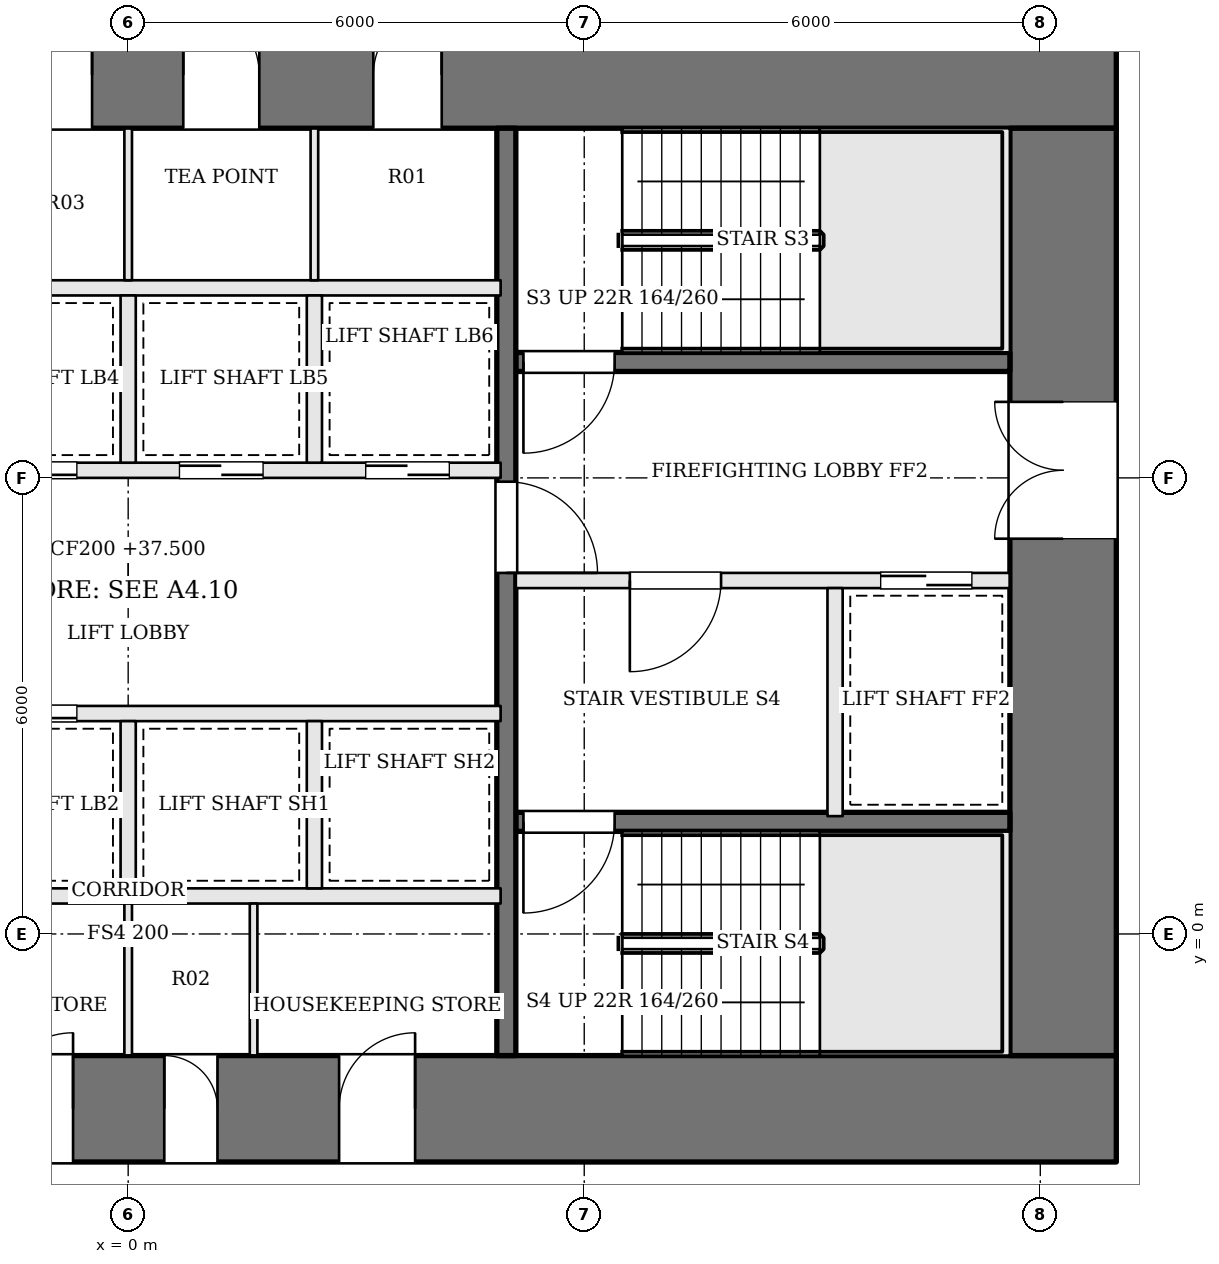
"""IFC4 building model, lengths in metres.
Left out: names, types, materials, properties, quantities, classifications, styles, units other than length and angle.
Written with IfcOpenShell. Run it as: python <this file> out.ifc"""

import sys

from ifc_helpers import new_model, si_unit, direction, frame, frame_2d, origin, place, context, subcontext, project, spatial, rectangle, extrude, element, fill, save


model = new_model("IFC4")
c1 = context("Model", 3, precision=1e-05, world=origin(), true_north=direction((0.0, 1.0)))
c2 = subcontext(c1, "Body", "Model", "MODEL_VIEW")
j1 = project(units=[si_unit("LENGTHUNIT", "METRE"), si_unit("PLANEANGLEUNIT", "RADIAN")], contexts=[c1])
p1 = place(None, origin())
s1 = spatial("IfcSite", under=j1, at=p1, CompositionType="ELEMENT")
p2 = place(p1, origin())
s2 = spatial("IfcBuilding", under=s1, at=p2, CompositionType="ELEMENT")
p3 = place(p2, frame((0.0, 0.0, 37.5)))
s3 = spatial("IfcBuildingStorey", under=s2, at=p3, CompositionType="ELEMENT", Elevation=37.5)
p4 = place(p3, frame((-13.0, 11.3, 0.0), z_axis=(0.0, 0.0, 1.0), x_axis=(1.0, 0.0, 0.0)))
e1 = element("IfcWall", 1, at=p4, inside=s3, PredefinedType="SHEAR", context=c2, shape_type="SweptSolid", body=[
    extrude(rectangle(XDim=26.0, YDim=1.4, at=frame_2d((13.0, 0.0))), origin(), (0.0, 0.0, 1.0), 3.6),
])
p5 = place(p4, frame((9.225, 0.0, 0.0)))
e2 = element("IfcOpeningElement", 2, at=p5, cuts=e1, PredefinedType="OPENING", context=c2, shape_type="SweptSolid", body=[
    extrude(rectangle(XDim=1.0, YDim=2.1, at=frame_2d((0.5, 1.05))), frame((0.0, 0.71, 0.0), z_axis=(0.0, -1.0, 0.0), x_axis=(1.0, 0.0, 0.0)), (0.0, 0.0, 1.0), 1.42),
])
p6 = place(p4, frame((11.825, 0.0, 0.0)))
e3 = element("IfcOpeningElement", 3, at=p6, cuts=e1, PredefinedType="OPENING", context=c2, shape_type="SweptSolid", body=[
    extrude(rectangle(XDim=0.7, YDim=2.1, at=frame_2d((0.35, 1.05))), frame((0.0, 0.71, 0.0), z_axis=(0.0, -1.0, 0.0), x_axis=(1.0, 0.0, 0.0)), (0.0, 0.0, 1.0), 1.42),
])
p7 = place(p4, frame((13.725, 0.0, 0.0)))
e4 = element("IfcOpeningElement", 4, at=p7, cuts=e1, PredefinedType="OPENING", context=c2, shape_type="SweptSolid", body=[
    extrude(rectangle(XDim=1.0, YDim=2.1, at=frame_2d((0.5, 1.05))), frame((0.0, 0.71, 0.0), z_axis=(0.0, -1.0, 0.0), x_axis=(1.0, 0.0, 0.0)), (0.0, 0.0, 1.0), 1.42),
])
p8 = place(p4, frame((16.225, 0.0, 0.0)))
e5 = element("IfcOpeningElement", 5, at=p8, cuts=e1, PredefinedType="OPENING", context=c2, shape_type="SweptSolid", body=[
    extrude(rectangle(XDim=0.9, YDim=2.1, at=frame_2d((0.45, 1.05))), frame((0.0, 0.71, 0.0), z_axis=(0.0, -1.0, 0.0), x_axis=(1.0, 0.0, 0.0)), (0.0, 0.0, 1.0), 1.42),
])
p9 = place(p3, frame((-13.0, -2.3, 0.0), z_axis=(0.0, 0.0, 1.0), x_axis=(1.0, 0.0, 0.0)))
e6 = element("IfcWall", 6, at=p9, inside=s3, PredefinedType="SHEAR", context=c2, shape_type="SweptSolid", body=[
    extrude(rectangle(XDim=26.0, YDim=1.4, at=frame_2d((13.0, 0.0))), origin(), (0.0, 0.0, 1.0), 3.6),
])
p10 = place(p9, frame((8.825, 0.0, 0.0)))
e7 = element("IfcOpeningElement", 7, at=p10, cuts=e6, PredefinedType="OPENING", context=c2, shape_type="SweptSolid", body=[
    extrude(rectangle(XDim=1.0, YDim=2.1, at=frame_2d((0.5, 1.05))), frame((0.0, 0.71, 0.0), z_axis=(0.0, -1.0, 0.0), x_axis=(1.0, 0.0, 0.0)), (0.0, 0.0, 1.0), 1.42),
])
p11 = place(p9, frame((11.275, 0.0, 0.0)))
e8 = element("IfcOpeningElement", 8, at=p11, cuts=e6, PredefinedType="OPENING", context=c2, shape_type="SweptSolid", body=[
    extrude(rectangle(XDim=1.0, YDim=2.1, at=frame_2d((0.5, 1.05))), frame((0.0, 0.71, 0.0), z_axis=(0.0, -1.0, 0.0), x_axis=(1.0, 0.0, 0.0)), (0.0, 0.0, 1.0), 1.42),
])
p12 = place(p9, frame((13.475, 0.0, 0.0)))
e9 = element("IfcOpeningElement", 9, at=p12, cuts=e6, PredefinedType="OPENING", context=c2, shape_type="SweptSolid", body=[
    extrude(rectangle(XDim=0.7, YDim=2.1, at=frame_2d((0.35, 1.05))), frame((0.0, 0.71, 0.0), z_axis=(0.0, -1.0, 0.0), x_axis=(1.0, 0.0, 0.0)), (0.0, 0.0, 1.0), 1.42),
])
p13 = place(p9, frame((15.775, 0.0, 0.0)))
e10 = element("IfcOpeningElement", 10, at=p13, cuts=e6, PredefinedType="OPENING", context=c2, shape_type="SweptSolid", body=[
    extrude(rectangle(XDim=1.0, YDim=2.1, at=frame_2d((0.5, 1.05))), frame((0.0, 0.71, 0.0), z_axis=(0.0, -1.0, 0.0), x_axis=(1.0, 0.0, 0.0)), (0.0, 0.0, 1.0), 1.42),
])
p14 = place(p3, frame((12.3, -1.6, 0.0), z_axis=(0.0, 0.0, 1.0), x_axis=(0.0, 1.0, 0.0)))
e11 = element("IfcWall", 11, at=p14, inside=s3, PredefinedType="SHEAR", context=c2, shape_type="SweptSolid", body=[
    extrude(rectangle(XDim=12.2, YDim=1.4, at=frame_2d((6.1, 0.0))), origin(), (0.0, 0.0, 1.0), 3.6),
])
p15 = place(p14, frame((6.8, 0.0, 0.0)))
e12 = element("IfcOpeningElement", 12, at=p15, cuts=e11, PredefinedType="OPENING", context=c2, shape_type="SweptSolid", body=[
    extrude(rectangle(XDim=1.8, YDim=2.1, at=frame_2d((0.9, 1.05))), frame((0.0, 0.71, 0.0), z_axis=(0.0, -1.0, 0.0), x_axis=(1.0, 0.0, 0.0)), (0.0, 0.0, 1.0), 1.42),
])
p16 = place(p3, frame((11.6, 7.525, 0.0), z_axis=(0.0, 0.0, 1.0), x_axis=(-1.0, 0.0, 0.0)))
e13 = element("IfcWall", 13, at=p16, inside=s3, PredefinedType="SOLIDWALL", context=c2, shape_type="SweptSolid", body=[
    extrude(rectangle(XDim=6.5, YDim=0.25, at=frame_2d((3.25, 0.0))), origin(), (0.0, 0.0, 1.0), 3.4),
])
p17 = place(p16, frame((5.2, 0.0, 0.0)))
e14 = element("IfcOpeningElement", 14, at=p17, cuts=e13, PredefinedType="OPENING", context=c2, shape_type="SweptSolid", body=[
    extrude(rectangle(XDim=1.2, YDim=2.1, at=frame_2d((0.6, 1.05))), frame((0.0, 0.135, 0.0), z_axis=(0.0, -1.0, 0.0), x_axis=(1.0, 0.0, 0.0)), (0.0, 0.0, 1.0), 0.27),
])
p18 = place(p3, frame((11.6, 4.65, 0.0), z_axis=(0.0, 0.0, 1.0), x_axis=(-1.0, 0.0, 0.0)))
e15 = element("IfcWall", 15, at=p18, inside=s3, PredefinedType="SOLIDWALL", context=c2, shape_type="SweptSolid", body=[
    extrude(rectangle(XDim=6.5, YDim=0.2, at=frame_2d((3.25, 0.0))), origin(), (0.0, 0.0, 1.0), 3.4),
])
p19 = place(p18, frame((3.8, 0.0, 0.0)))
e16 = element("IfcOpeningElement", 16, at=p19, cuts=e15, PredefinedType="OPENING", context=c2, shape_type="SweptSolid", body=[
    extrude(rectangle(XDim=1.2, YDim=2.1, at=frame_2d((0.6, 1.05))), frame((0.0, 0.11, 0.0), z_axis=(0.0, -1.0, 0.0), x_axis=(1.0, 0.0, 0.0)), (0.0, 0.0, 1.0), 0.22),
])
p20 = place(p18, frame((0.5, 0.0, 0.0)))
e17 = element("IfcOpeningElement", 17, at=p20, cuts=e15, PredefinedType="OPENING", context=c2, shape_type="SweptSolid", body=[
    extrude(rectangle(XDim=1.2, YDim=2.1, at=frame_2d((0.6, 1.05))), frame((0.0, 0.11, 0.0), z_axis=(0.0, -1.0, 0.0), x_axis=(1.0, 0.0, 0.0)), (0.0, 0.0, 1.0), 0.22),
])
p21 = place(p3, frame((11.6, 1.475, 0.0), z_axis=(0.0, 0.0, 1.0), x_axis=(-1.0, 0.0, 0.0)))
e18 = element("IfcWall", 18, at=p21, inside=s3, PredefinedType="SOLIDWALL", context=c2, shape_type="SweptSolid", body=[
    extrude(rectangle(XDim=6.5, YDim=0.25, at=frame_2d((3.25, 0.0))), origin(), (0.0, 0.0, 1.0), 3.4),
])
p22 = place(p21, frame((5.2, 0.0, 0.0)))
e19 = element("IfcOpeningElement", 19, at=p22, cuts=e18, PredefinedType="OPENING", context=c2, shape_type="SweptSolid", body=[
    extrude(rectangle(XDim=1.2, YDim=2.1, at=frame_2d((0.6, 1.05))), frame((0.0, 0.135, 0.0), z_axis=(0.0, -1.0, 0.0), x_axis=(1.0, 0.0, 0.0)), (0.0, 0.0, 1.0), 0.27),
])
p23 = place(p3, frame((9.3, 4.55, 0.0), z_axis=(0.0, 0.0, 1.0), x_axis=(0.0, -1.0, 0.0)))
e20 = element("IfcWall", 20, at=p23, inside=s3, PredefinedType="SOLIDWALL", context=c2, shape_type="SweptSolid", body=[
    extrude(rectangle(XDim=3.0, YDim=0.2, at=frame_2d((1.5, 0.0))), origin(), (0.0, 0.0, 1.0), 3.4),
])
p24 = place(p3, frame((4.975, 10.6, 0.0), z_axis=(0.0, 0.0, 1.0), x_axis=(0.0, -1.0, 0.0)))
e21 = element("IfcWall", 21, at=p24, inside=s3, PredefinedType="SOLIDWALL", context=c2, shape_type="SweptSolid", body=[
    extrude(rectangle(XDim=12.2, YDim=0.25, at=frame_2d((6.1, 0.0))), origin(), (0.0, 0.0, 1.0), 3.4),
])
p25 = place(p24, frame((4.65, 0.0, 0.0)))
e22 = element("IfcOpeningElement", 22, at=p25, cuts=e21, PredefinedType="OPENING", context=c2, shape_type="SweptSolid", body=[
    extrude(rectangle(XDim=1.2, YDim=2.1, at=frame_2d((0.6, 1.05))), frame((0.0, 0.135, 0.0), z_axis=(0.0, -1.0, 0.0), x_axis=(1.0, 0.0, 0.0)), (0.0, 0.0, 1.0), 0.27),
])
p26 = place(p3, frame((-4.9, 0.5, 0.0), z_axis=(0.0, 0.0, 1.0), x_axis=(1.0, 0.0, 0.0)))
e23 = element("IfcWall", 23, at=p26, inside=s3, PredefinedType="SOLIDWALL", context=c2, shape_type="SweptSolid", body=[
    extrude(rectangle(XDim=9.8, YDim=0.2, at=frame_2d((4.9, 0.0))), origin(), (0.0, 0.0, 1.0), 3.4),
])
p27 = place(p3, frame((-4.9, 2.9, 0.0), z_axis=(0.0, 0.0, 1.0), x_axis=(1.0, 0.0, 0.0)))
e24 = element("IfcWall", 24, at=p27, inside=s3, PredefinedType="SOLIDWALL", context=c2, shape_type="SweptSolid", body=[
    extrude(rectangle(XDim=9.8, YDim=0.2, at=frame_2d((4.9, 0.0))), origin(), (0.0, 0.0, 1.0), 3.4),
])
p28 = place(p27, frame((0.675, 0.0, 0.0)))
e25 = element("IfcOpeningElement", 25, at=p28, cuts=e24, PredefinedType="OPENING", context=c2, shape_type="SweptSolid", body=[
    extrude(rectangle(XDim=1.1, YDim=2.1, at=frame_2d((0.55, 1.05))), frame((0.0, 0.11, 0.0), z_axis=(0.0, -1.0, 0.0), x_axis=(1.0, 0.0, 0.0)), (0.0, 0.0, 1.0), 0.22),
])
p29 = place(p27, frame((3.125, 0.0, 0.0)))
e26 = element("IfcOpeningElement", 26, at=p29, cuts=e24, PredefinedType="OPENING", context=c2, shape_type="SweptSolid", body=[
    extrude(rectangle(XDim=1.1, YDim=2.1, at=frame_2d((0.55, 1.05))), frame((0.0, 0.11, 0.0), z_axis=(0.0, -1.0, 0.0), x_axis=(1.0, 0.0, 0.0)), (0.0, 0.0, 1.0), 0.22),
])
p30 = place(p3, frame((-4.9, 6.1, 0.0), z_axis=(0.0, 0.0, 1.0), x_axis=(1.0, 0.0, 0.0)))
e27 = element("IfcWall", 27, at=p30, inside=s3, PredefinedType="SOLIDWALL", context=c2, shape_type="SweptSolid", body=[
    extrude(rectangle(XDim=9.8, YDim=0.2, at=frame_2d((4.9, 0.0))), origin(), (0.0, 0.0, 1.0), 3.4),
])
p31 = place(p30, frame((0.675, 0.0, 0.0)))
e28 = element("IfcOpeningElement", 28, at=p31, cuts=e27, PredefinedType="OPENING", context=c2, shape_type="SweptSolid", body=[
    extrude(rectangle(XDim=1.1, YDim=2.1, at=frame_2d((0.55, 1.05))), frame((0.0, 0.11, 0.0), z_axis=(0.0, -1.0, 0.0), x_axis=(1.0, 0.0, 0.0)), (0.0, 0.0, 1.0), 0.22),
])
p32 = place(p30, frame((3.125, 0.0, 0.0)))
e29 = element("IfcOpeningElement", 29, at=p32, cuts=e27, PredefinedType="OPENING", context=c2, shape_type="SweptSolid", body=[
    extrude(rectangle(XDim=1.1, YDim=2.1, at=frame_2d((0.55, 1.05))), frame((0.0, 0.11, 0.0), z_axis=(0.0, -1.0, 0.0), x_axis=(1.0, 0.0, 0.0)), (0.0, 0.0, 1.0), 0.22),
])
p33 = place(p30, frame((5.575, 0.0, 0.0)))
e30 = element("IfcOpeningElement", 30, at=p33, cuts=e27, PredefinedType="OPENING", context=c2, shape_type="SweptSolid", body=[
    extrude(rectangle(XDim=1.1, YDim=2.1, at=frame_2d((0.55, 1.05))), frame((0.0, 0.11, 0.0), z_axis=(0.0, -1.0, 0.0), x_axis=(1.0, 0.0, 0.0)), (0.0, 0.0, 1.0), 0.22),
])
p34 = place(p30, frame((8.025, 0.0, 0.0)))
e31 = element("IfcOpeningElement", 31, at=p34, cuts=e27, PredefinedType="OPENING", context=c2, shape_type="SweptSolid", body=[
    extrude(rectangle(XDim=1.1, YDim=2.1, at=frame_2d((0.55, 1.05))), frame((0.0, 0.11, 0.0), z_axis=(0.0, -1.0, 0.0), x_axis=(1.0, 0.0, 0.0)), (0.0, 0.0, 1.0), 0.22),
])
p35 = place(p3, frame((-4.9, 8.5, 0.0), z_axis=(0.0, 0.0, 1.0), x_axis=(1.0, 0.0, 0.0)))
e32 = element("IfcWall", 32, at=p35, inside=s3, PredefinedType="SOLIDWALL", context=c2, shape_type="SweptSolid", body=[
    extrude(rectangle(XDim=9.8, YDim=0.2, at=frame_2d((4.9, 0.0))), origin(), (0.0, 0.0, 1.0), 3.4),
])
for number, where, z_axis, x_axis in (
    (33, (0.0, 0.6, 0.0), (0.0, 0.0, 1.0), (0.0, 1.0, 0.0)),
    (34, (2.45, 0.6, 0.0), (0.0, 0.0, 1.0), (0.0, 1.0, 0.0)),
    (35, (0.0, 6.2, 0.0), (0.0, 0.0, 1.0), (0.0, 1.0, 0.0)),
    (36, (2.45, 6.2, 0.0), (0.0, 0.0, 1.0), (0.0, 1.0, 0.0)),
):
    element("IfcWall", number, at=place(p3, frame(where, z_axis=z_axis, x_axis=x_axis)), inside=s3, PredefinedType="SOLIDWALL", context=c2, shape_type="SweptSolid", body=[
        extrude(rectangle(XDim=2.2, YDim=0.2, at=frame_2d((1.1, 0.0))), origin(), (0.0, 0.0, 1.0), 3.4),
    ])
for number, where, z_axis, x_axis in (
    (37, (0.0, -1.6, 0.0), (0.0, 0.0, 1.0), (0.0, 1.0, 0.0)),
    (38, (1.65, -1.6, 0.0), (0.0, 0.0, 1.0), (0.0, 1.0, 0.0)),
    (39, (0.0, 8.6, 0.0), (0.0, 0.0, 1.0), (0.0, 1.0, 0.0)),
    (40, (2.45, 8.6, 0.0), (0.0, 0.0, 1.0), (0.0, 1.0, 0.0)),
):
    element("IfcWall", number, at=place(p3, frame(where, z_axis=z_axis, x_axis=x_axis)), inside=s3, PredefinedType="PARTITIONING", context=c2, shape_type="SweptSolid", body=[
        extrude(rectangle(XDim=2.0, YDim=0.1, at=frame_2d((1.0, 0.0))), origin(), (0.0, 0.0, 1.0), 3.4),
    ])
p36 = place(p15, origin())
e41 = element("IfcDoor", 41, at=p36, inside=s3, OperationType="DOUBLE_DOOR_SINGLE_SWING", PredefinedType="DOOR", context=c2, shape_type="SweptSolid", body=[
    extrude(rectangle(XDim=1.8, YDim=2.1, at=frame_2d((0.9, 1.05))), frame((0.0, 0.025, 0.0), z_axis=(0.0, -1.0, 0.0), x_axis=(1.0, 0.0, 0.0)), (0.0, 0.0, 1.0), 0.05),
])
fill(e12, e41)
p37 = place(p25, origin())
e42 = element("IfcDoor", 42, at=p37, inside=s3, OperationType="SINGLE_SWING_RIGHT", PredefinedType="DOOR", context=c2, shape_type="SweptSolid", body=[
    extrude(rectangle(XDim=1.2, YDim=2.1, at=frame_2d((0.6, 1.05))), frame((0.0, 0.025, 0.0), z_axis=(0.0, -1.0, 0.0), x_axis=(1.0, 0.0, 0.0)), (0.0, 0.0, 1.0), 0.05),
])
fill(e22, e42)
p38 = place(p19, origin())
e43 = element("IfcDoor", 43, at=p38, inside=s3, OperationType="SINGLE_SWING_RIGHT", PredefinedType="DOOR", context=c2, shape_type="SweptSolid", body=[
    extrude(rectangle(XDim=1.2, YDim=2.1, at=frame_2d((0.6, 1.05))), frame((0.0, 0.025, 0.0), z_axis=(0.0, -1.0, 0.0), x_axis=(1.0, 0.0, 0.0)), (0.0, 0.0, 1.0), 0.05),
])
fill(e16, e43)
p39 = place(p17, origin())
e44 = element("IfcDoor", 44, at=p39, inside=s3, OperationType="SINGLE_SWING_RIGHT", PredefinedType="DOOR", context=c2, shape_type="SweptSolid", body=[
    extrude(rectangle(XDim=1.2, YDim=2.1, at=frame_2d((0.6, 1.05))), frame((0.0, 0.025, 0.0), z_axis=(0.0, -1.0, 0.0), x_axis=(1.0, 0.0, 0.0)), (0.0, 0.0, 1.0), 0.05),
])
fill(e14, e44)
p40 = place(p22, origin())
e45 = element("IfcDoor", 45, at=p40, inside=s3, OperationType="SINGLE_SWING_RIGHT", PredefinedType="DOOR", context=c2, shape_type="SweptSolid", body=[
    extrude(rectangle(XDim=1.2, YDim=2.1, at=frame_2d((0.6, 1.05))), frame((0.0, 0.025, 0.0), z_axis=(0.0, -1.0, 0.0), x_axis=(1.0, 0.0, 0.0)), (0.0, 0.0, 1.0), 0.05),
])
fill(e19, e45)
p41 = place(p20, origin())
e46 = element("IfcDoor", 46, at=p41, inside=s3, OperationType="SLIDING_TO_RIGHT", PredefinedType="DOOR", context=c2, shape_type="SweptSolid", body=[
    extrude(rectangle(XDim=1.2, YDim=2.1, at=frame_2d((0.6, 1.05))), frame((0.0, 0.025, 0.0), z_axis=(0.0, -1.0, 0.0), x_axis=(1.0, 0.0, 0.0)), (0.0, 0.0, 1.0), 0.05),
])
fill(e17, e46)
p42 = place(p29, origin())
e47 = element("IfcDoor", 47, at=p42, inside=s3, OperationType="SLIDING_TO_LEFT", PredefinedType="DOOR", context=c2, shape_type="SweptSolid", body=[
    extrude(rectangle(XDim=1.1, YDim=2.1, at=frame_2d((0.55, 1.05))), frame((0.0, 0.025, 0.0), z_axis=(0.0, -1.0, 0.0), x_axis=(1.0, 0.0, 0.0)), (0.0, 0.0, 1.0), 0.05),
])
fill(e26, e47)
p43 = place(p32, origin())
e48 = element("IfcDoor", 48, at=p43, inside=s3, OperationType="SLIDING_TO_LEFT", PredefinedType="DOOR", context=c2, shape_type="SweptSolid", body=[
    extrude(rectangle(XDim=1.1, YDim=2.1, at=frame_2d((0.55, 1.05))), frame((0.0, 0.025, 0.0), z_axis=(0.0, -1.0, 0.0), x_axis=(1.0, 0.0, 0.0)), (0.0, 0.0, 1.0), 0.05),
])
fill(e29, e48)
p44 = place(p33, origin())
e49 = element("IfcDoor", 49, at=p44, inside=s3, OperationType="SLIDING_TO_RIGHT", PredefinedType="DOOR", context=c2, shape_type="SweptSolid", body=[
    extrude(rectangle(XDim=1.1, YDim=2.1, at=frame_2d((0.55, 1.05))), frame((0.0, 0.025, 0.0), z_axis=(0.0, -1.0, 0.0), x_axis=(1.0, 0.0, 0.0)), (0.0, 0.0, 1.0), 0.05),
])
fill(e30, e49)
p45 = place(p34, origin())
e50 = element("IfcDoor", 50, at=p45, inside=s3, OperationType="SLIDING_TO_LEFT", PredefinedType="DOOR", context=c2, shape_type="SweptSolid", body=[
    extrude(rectangle(XDim=1.1, YDim=2.1, at=frame_2d((0.55, 1.05))), frame((0.0, 0.025, 0.0), z_axis=(0.0, -1.0, 0.0), x_axis=(1.0, 0.0, 0.0)), (0.0, 0.0, 1.0), 0.05),
])
fill(e31, e50)
p46 = place(p11, origin())
e51 = element("IfcDoor", 51, at=p46, inside=s3, OperationType="SINGLE_SWING_RIGHT", PredefinedType="DOOR", context=c2, shape_type="SweptSolid", body=[
    extrude(rectangle(XDim=1.0, YDim=2.1, at=frame_2d((0.5, 1.05))), frame((0.0, 0.025, 0.0), z_axis=(0.0, -1.0, 0.0), x_axis=(1.0, 0.0, 0.0)), (0.0, 0.0, 1.0), 0.05),
])
fill(e8, e51)
p47 = place(p12, origin())
e52 = element("IfcDoor", 52, at=p47, inside=s3, OperationType="SINGLE_SWING_LEFT", PredefinedType="DOOR", context=c2, shape_type="SweptSolid", body=[
    extrude(rectangle(XDim=0.7, YDim=2.1, at=frame_2d((0.35, 1.05))), frame((0.0, 0.025, 0.0), z_axis=(0.0, -1.0, 0.0), x_axis=(1.0, 0.0, 0.0)), (0.0, 0.0, 1.0), 0.05),
])
fill(e9, e52)
p48 = place(p13, origin())
e53 = element("IfcDoor", 53, at=p48, inside=s3, OperationType="SINGLE_SWING_RIGHT", PredefinedType="DOOR", context=c2, shape_type="SweptSolid", body=[
    extrude(rectangle(XDim=1.0, YDim=2.1, at=frame_2d((0.5, 1.05))), frame((0.0, 0.025, 0.0), z_axis=(0.0, -1.0, 0.0), x_axis=(1.0, 0.0, 0.0)), (0.0, 0.0, 1.0), 0.05),
])
fill(e10, e53)
p49 = place(p6, origin())
e54 = element("IfcDoor", 54, at=p49, inside=s3, OperationType="SINGLE_SWING_RIGHT", PredefinedType="DOOR", context=c2, shape_type="SweptSolid", body=[
    extrude(rectangle(XDim=0.7, YDim=2.1, at=frame_2d((0.35, 1.05))), frame((0.0, 0.025, 0.0), z_axis=(0.0, -1.0, 0.0), x_axis=(1.0, 0.0, 0.0)), (0.0, 0.0, 1.0), 0.05),
])
fill(e3, e54)
p50 = place(p7, origin())
e55 = element("IfcDoor", 55, at=p50, inside=s3, OperationType="SINGLE_SWING_LEFT", PredefinedType="DOOR", context=c2, shape_type="SweptSolid", body=[
    extrude(rectangle(XDim=1.0, YDim=2.1, at=frame_2d((0.5, 1.05))), frame((0.0, 0.025, 0.0), z_axis=(0.0, -1.0, 0.0), x_axis=(1.0, 0.0, 0.0)), (0.0, 0.0, 1.0), 0.05),
])
fill(e4, e55)
p51 = place(p8, origin())
e56 = element("IfcDoor", 56, at=p51, inside=s3, OperationType="SINGLE_SWING_RIGHT", PredefinedType="DOOR", context=c2, shape_type="SweptSolid", body=[
    extrude(rectangle(XDim=0.9, YDim=2.1, at=frame_2d((0.45, 1.05))), frame((0.0, 0.025, 0.0), z_axis=(0.0, -1.0, 0.0), x_axis=(1.0, 0.0, 0.0)), (0.0, 0.0, 1.0), 0.05),
])
fill(e5, e56)
save(model, sys.argv[1])
